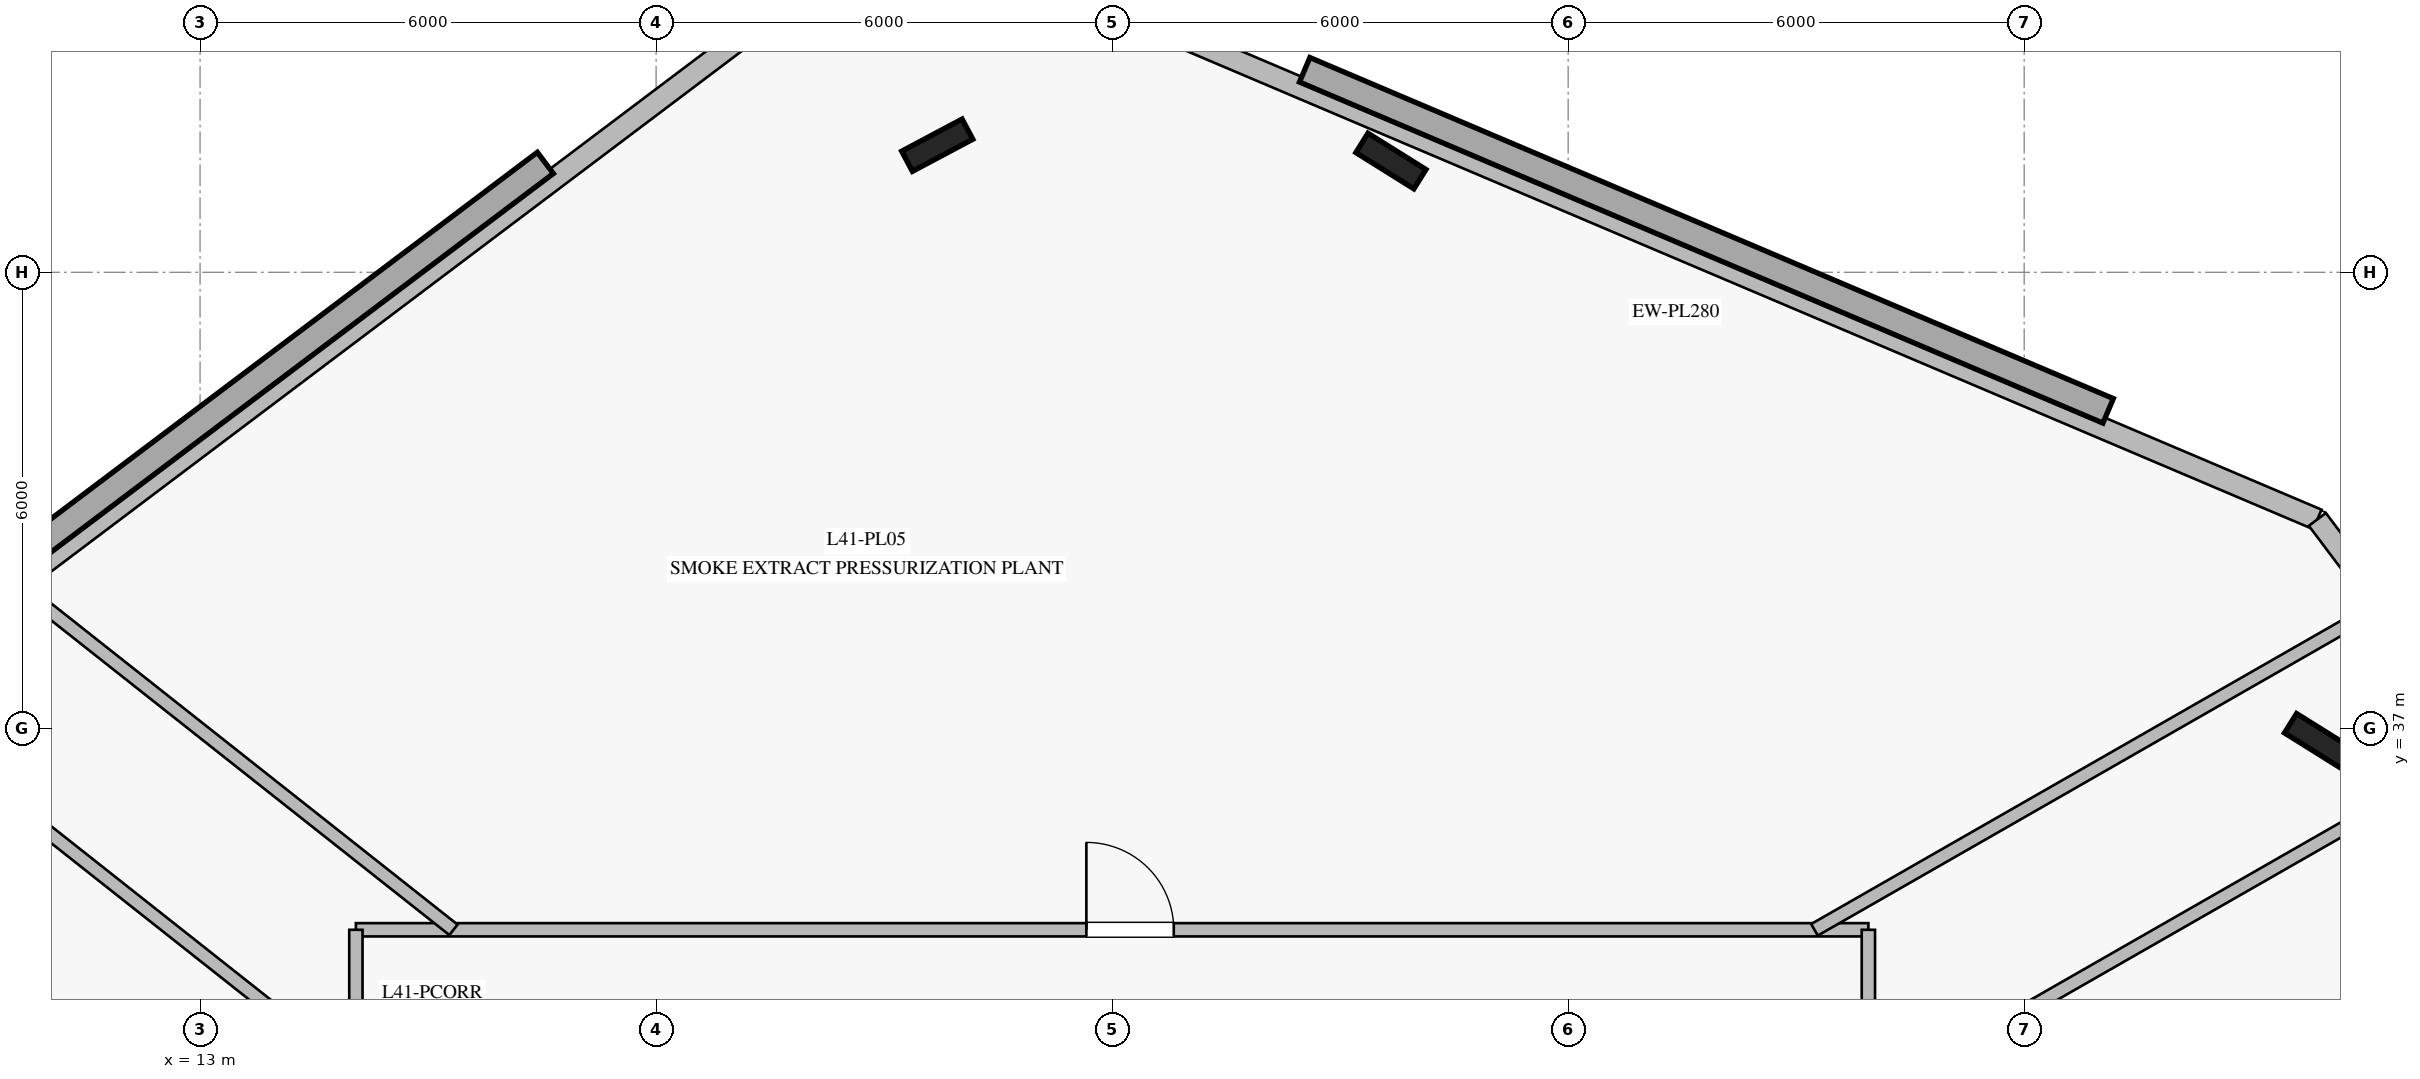
"""IFC4 building model, lengths in metres.
Left out: names, types, materials, properties, quantities, classifications, styles, units other than length and angle.
Written with IfcOpenShell. Run it as: python <this file> out.ifc"""

import sys

from ifc_helpers import new_model, si_unit, direction, frame, frame_2d, origin, origin_2d, place, context, subcontext, project, spatial, rectangle, i_section, extrude, element, fill, save


model = new_model("IFC4")
c1 = context("Model", 3, precision=1e-05, world=origin(), true_north=direction((0.0, 1.0)))
c2 = subcontext(c1, "Body", "Model", "MODEL_VIEW")
j1 = project(units=[si_unit("LENGTHUNIT", "METRE"), si_unit("PLANEANGLEUNIT", "RADIAN")], contexts=[c1])
p1 = place(None, origin())
s1 = spatial("IfcSite", under=j1, at=p1, CompositionType="ELEMENT")
p2 = place(p1, origin())
s2 = spatial("IfcBuilding", under=s1, at=p2, CompositionType="ELEMENT")
p3 = place(p2, frame((0.0, 0.0, 170.4)))
s3 = spatial("IfcBuildingStorey", under=s2, at=p3, CompositionType="ELEMENT", Elevation=170.4)
for number, where, z_axis, x_axis in (
    (1, (40.886, 36.829, 0.0), (0.0, 0.0, 1.0), (-0.848, 0.53, 0.0)),
    (2, (28.668, 44.464, 0.0), (0.0, 0.0, 1.0), (-0.848, 0.53, 0.0)),
    (3, (22.699, 44.672, 0.0), (0.0, 0.0, 1.0), (0.883, 0.469, 0.0)),
):
    element("IfcColumn", number, at=place(p3, frame(where, z_axis=z_axis, x_axis=x_axis)), inside=s3, PredefinedType="COLUMN", context=c2, shape_type="SweptSolid", body=[
        extrude(i_section(OverallWidth=0.3, OverallDepth=0.9, WebThickness=0.019, FlangeThickness=0.035, at=origin_2d()), origin(), (0.0, 0.0, 1.0), 5.4),
    ])
p4 = place(p3, frame((40.857, 39.749, 0.0), z_axis=(0.0, 0.0, 1.0), x_axis=(-0.920507541963, 0.390724794695, 0.0)))
e4 = element("IfcWall", 4, at=p4, inside=s3, PredefinedType="STANDARD", context=c2, shape_type="SweptSolid", body=[
    extrude(rectangle(XDim=17.667, YDim=0.28, at=frame_2d((8.834, 0.0))), origin(), (0.0, 0.0, 1.0), 5.14),
])
p5 = place(p3, frame((20.156, 46.108, 0.0), z_axis=(0.0, 0.0, 1.0), x_axis=(-0.798606661406, -0.601853304684, 0.0)))
e5 = element("IfcWall", 5, at=p5, inside=s3, PredefinedType="STANDARD", context=c2, shape_type="SweptSolid", body=[
    extrude(rectangle(XDim=17.668, YDim=0.28, at=frame_2d((8.834, 0.0))), origin(), (0.0, 0.0, 1.0), 5.14),
])
p6 = place(p3, frame((43.548, 36.178, 0.0), z_axis=(0.0, 0.0, 1.0), x_axis=(-0.601841660076, 0.798615436989, 0.0)))
e6 = element("IfcWall", 6, at=p6, inside=s3, PredefinedType="STANDARD", context=c2, shape_type="SweptSolid", body=[
    extrude(rectangle(XDim=4.471, YDim=0.28, at=frame_2d((2.236, 0.0))), origin(), (0.0, 0.0, 1.0), 5.14),
])
p7 = place(p3, frame((15.05, 34.35, 0.0), z_axis=(0.0, 0.0, 1.0), x_axis=(1.0, 0.0, 0.0)))
e7 = element("IfcWall", 7, at=p7, inside=s3, PredefinedType="PARTITIONING", context=c2, shape_type="SweptSolid", body=[
    extrude(rectangle(XDim=19.9, YDim=0.175, at=frame_2d((9.95, 0.0))), origin(), (0.0, 0.0, 1.0), 3.54),
])
p8 = place(p7, frame((9.611, 0.0, 0.0)))
e8 = element("IfcOpeningElement", 8, at=p8, cuts=e7, PredefinedType="OPENING", context=c2, shape_type="SweptSolid", body=[
    extrude(rectangle(XDim=1.15, YDim=2.2, at=frame_2d((0.575, 1.1))), frame((0.0, 0.098, 0.0), z_axis=(0.0, -1.0, 0.0), x_axis=(1.0, 0.0, 0.0)), (0.0, 0.0, 1.0), 0.195),
])
p9 = place(p3, frame((34.95, 34.35, 0.0), z_axis=(0.0, 0.0, 1.0), x_axis=(0.0, -1.0, 0.0)))
e9 = element("IfcWall", 9, at=p9, inside=s3, PredefinedType="PARTITIONING", context=c2, shape_type="SweptSolid", body=[
    extrude(rectangle(XDim=18.7, YDim=0.175, at=frame_2d((9.35, 0.0))), origin(), (0.0, 0.0, 1.0), 3.54),
])
p10 = place(p9, frame((12.525, 0.0, 0.0)))
e10 = element("IfcOpeningElement", 10, at=p10, cuts=e9, PredefinedType="OPENING", context=c2, shape_type="SweptSolid", body=[
    extrude(rectangle(XDim=1.15, YDim=2.2, at=frame_2d((0.575, 1.1))), frame((0.0, 0.098, 0.0), z_axis=(0.0, -1.0, 0.0), x_axis=(1.0, 0.0, 0.0)), (0.0, 0.0, 1.0), 0.195),
])
p11 = place(p9, frame((5.2, 0.0, 0.0)))
e11 = element("IfcOpeningElement", 11, at=p11, cuts=e9, PredefinedType="OPENING", context=c2, shape_type="SweptSolid", body=[
    extrude(rectangle(XDim=1.15, YDim=2.2, at=frame_2d((0.575, 1.1))), frame((0.0, 0.098, 0.0), z_axis=(0.0, -1.0, 0.0), x_axis=(1.0, 0.0, 0.0)), (0.0, 0.0, 1.0), 0.195),
])
p12 = place(p3, frame((15.05, 15.65, 0.0), z_axis=(0.0, 0.0, 1.0), x_axis=(0.0, 1.0, 0.0)))
e12 = element("IfcWall", 12, at=p12, inside=s3, PredefinedType="PARTITIONING", context=c2, shape_type="SweptSolid", body=[
    extrude(rectangle(XDim=18.7, YDim=0.175, at=frame_2d((9.35, 0.0))), origin(), (0.0, 0.0, 1.0), 3.54),
])
p13 = place(p12, frame((5.085, 0.0, 0.0)))
e13 = element("IfcOpeningElement", 13, at=p13, cuts=e12, PredefinedType="OPENING", context=c2, shape_type="SweptSolid", body=[
    extrude(rectangle(XDim=1.2, YDim=2.25, at=frame_2d((0.6, 1.125))), frame((0.0, 0.098, 0.0), z_axis=(0.0, -1.0, 0.0), x_axis=(1.0, 0.0, 0.0)), (0.0, 0.0, 1.0), 0.195),
])
p14 = place(p12, frame((12.525, 0.0, 0.0)))
e14 = element("IfcOpeningElement", 14, at=p14, cuts=e12, PredefinedType="OPENING", context=c2, shape_type="SweptSolid", body=[
    extrude(rectangle(XDim=1.15, YDim=2.2, at=frame_2d((0.575, 1.1))), frame((0.0, 0.098, 0.0), z_axis=(0.0, -1.0, 0.0), x_axis=(1.0, 0.0, 0.0)), (0.0, 0.0, 1.0), 0.195),
])
p15 = place(p3, frame((34.95, 32.106, 0.0), z_axis=(0.0, 0.0, 1.0), x_axis=(0.867870917182, 0.496789765504, 0.0)))
e15 = element("IfcWall", 15, at=p15, inside=s3, PredefinedType="PARTITIONING", context=c2, shape_type="SweptSolid", body=[
    extrude(rectangle(XDim=9.33, YDim=0.175, at=frame_2d((4.665, 0.0))), origin(), (0.0, 0.0, 1.0), 3.53),
])
p16 = place(p3, frame((34.241, 34.35, 0.0), z_axis=(0.0, 0.0, 1.0), x_axis=(0.86783997446, 0.49684381724, 0.0)))
e16 = element("IfcWall", 16, at=p16, inside=s3, PredefinedType="PARTITIONING", context=c2, shape_type="SweptSolid", body=[
    extrude(rectangle(XDim=8.54, YDim=0.175, at=frame_2d((4.27, 0.0))), origin(), (0.0, 0.0, 1.0), 3.53),
])
p17 = place(p3, frame((16.334, 34.35, 0.0), z_axis=(0.0, 0.0, 1.0), x_axis=(-0.784600993116, 0.620001033549, 0.0)))
e17 = element("IfcWall", 17, at=p17, inside=s3, PredefinedType="PARTITIONING", context=c2, shape_type="SweptSolid", body=[
    extrude(rectangle(XDim=7.254, YDim=0.175, at=frame_2d((3.627, 0.0))), origin(), (0.0, 0.0, 1.0), 3.53),
])
p18 = place(p3, frame((15.05, 32.433, 0.0), z_axis=(0.0, 0.0, 1.0), x_axis=(-0.784559222655, 0.620053889712, 0.0)))
e18 = element("IfcWall", 18, at=p18, inside=s3, PredefinedType="PARTITIONING", context=c2, shape_type="SweptSolid", body=[
    extrude(rectangle(XDim=8.038, YDim=0.175, at=frame_2d((4.019, 0.0))), origin(), (0.0, 0.0, 1.0), 3.53),
])
p19 = place(p8, origin())
e19 = element("IfcDoor", 19, at=p19, inside=s3, OperationType="SINGLE_SWING_LEFT", PredefinedType="DOOR", context=c2, shape_type="SweptSolid", body=[
    extrude(rectangle(XDim=1.15, YDim=2.2, at=frame_2d((0.575, 1.1))), frame((0.0, 0.025, 0.0), z_axis=(0.0, -1.0, 0.0), x_axis=(1.0, 0.0, 0.0)), (0.0, 0.0, 1.0), 0.05),
])
fill(e8, e19)
save(model, sys.argv[1])
